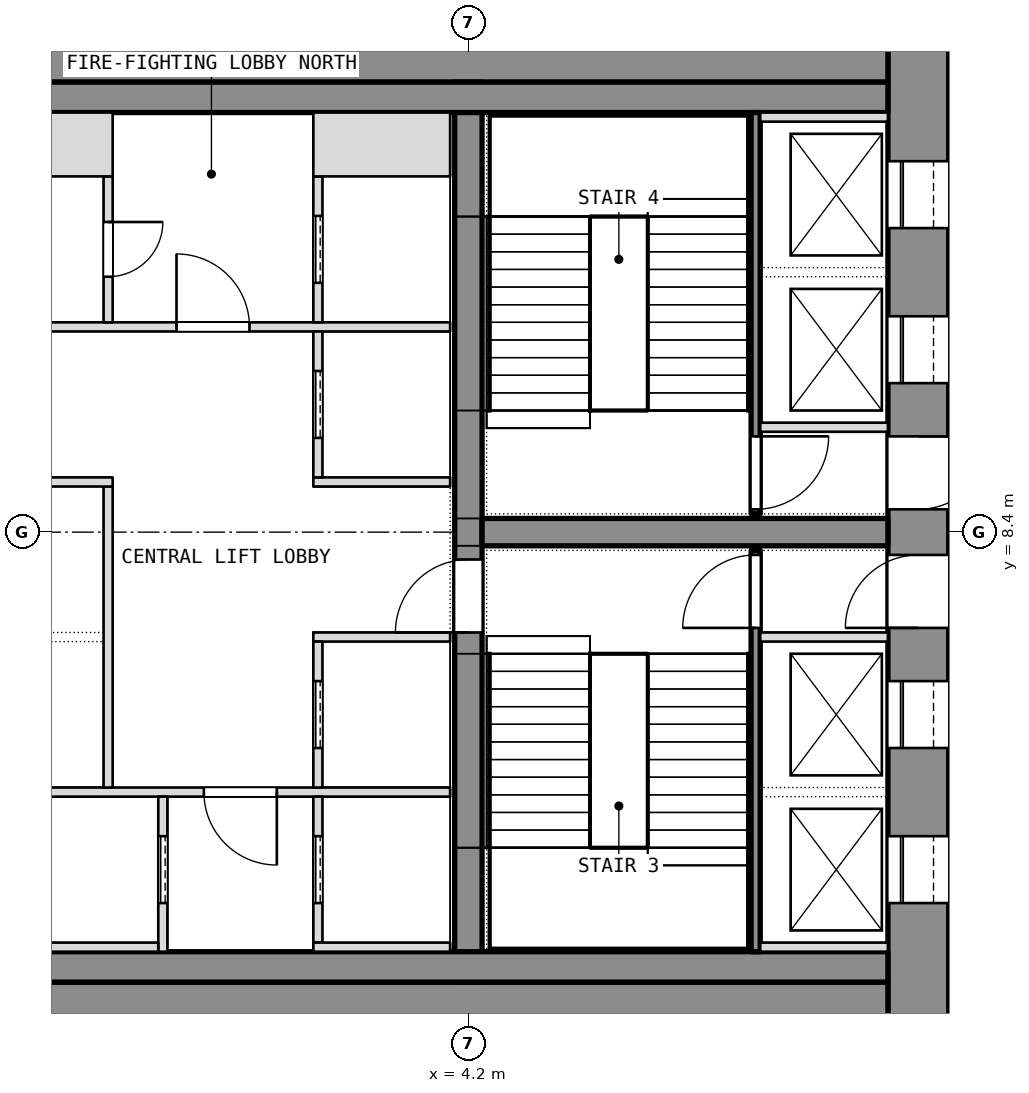
"""IFC4 building model, lengths in metres.
Left out: names, types, materials, properties, quantities, classifications, styles, units other than length and angle.
Written with IfcOpenShell. Run it as: python <this file> out.ifc"""

import sys

from ifc_helpers import new_model, si_unit, direction, frame, frame_2d, origin, place, context, subcontext, project, spatial, rectangle, extrude, element, fill, save


model = new_model("IFC4")
c1 = context("Model", 3, precision=1e-05, world=origin(), true_north=direction((0.0, 1.0)))
c2 = subcontext(c1, "Body", "Model", "MODEL_VIEW")
j1 = project(units=[si_unit("LENGTHUNIT", "METRE"), si_unit("PLANEANGLEUNIT", "RADIAN")], contexts=[c1])
p1 = place(None, origin())
s1 = spatial("IfcSite", under=j1, at=p1, CompositionType="ELEMENT")
p2 = place(p1, origin())
s2 = spatial("IfcBuilding", under=s1, at=p2, CompositionType="ELEMENT")
p3 = place(p2, frame((0.0, 0.0, 97.7)))
s3 = spatial("IfcBuildingStorey", under=s2, at=p3, CompositionType="ELEMENT", Elevation=97.7)
p4 = place(p3, frame((11.6, 0.0, 0.0), z_axis=(0.0, 0.0, 1.0), x_axis=(0.0, 1.0, 0.0)))
e1 = element("IfcWall", 1, at=p4, inside=s3, PredefinedType="SHEAR", context=c2, shape_type="SweptSolid", body=[
    extrude(rectangle(XDim=16.8, YDim=1.0, at=frame_2d((8.4, 0.0))), origin(), (0.0, 0.0, 1.0), 7.2),
])
p5 = place(p4, frame((2.3, 0.0, 0.0)))
e2 = element("IfcOpeningElement", 2, at=p5, cuts=e1, PredefinedType="OPENING", context=c2, shape_type="SweptSolid", body=[
    extrude(rectangle(XDim=1.1, YDim=2.1, at=frame_2d((0.55, 1.05))), frame((0.0, 0.5, 0.0), z_axis=(0.0, -1.0, 0.0), x_axis=(1.0, 0.0, 0.0)), (0.0, 0.0, 1.0), 1.0),
])
p6 = place(p4, frame((4.85, 0.0, 0.0)))
e3 = element("IfcOpeningElement", 3, at=p6, cuts=e1, PredefinedType="OPENING", context=c2, shape_type="SweptSolid", body=[
    extrude(rectangle(XDim=1.1, YDim=2.1, at=frame_2d((0.55, 1.05))), frame((0.0, 0.5, 0.0), z_axis=(0.0, -1.0, 0.0), x_axis=(1.0, 0.0, 0.0)), (0.0, 0.0, 1.0), 1.0),
])
p7 = place(p4, frame((6.825, 0.0, 0.0)))
e4 = element("IfcOpeningElement", 4, at=p7, cuts=e1, PredefinedType="OPENING", context=c2, shape_type="SweptSolid", body=[
    extrude(rectangle(XDim=1.2, YDim=2.1, at=frame_2d((0.6, 1.05))), frame((0.0, 0.5, 0.0), z_axis=(0.0, -1.0, 0.0), x_axis=(1.0, 0.0, 0.0)), (0.0, 0.0, 1.0), 1.0),
])
p8 = place(p4, frame((13.4, 0.0, 0.0)))
e5 = element("IfcOpeningElement", 5, at=p8, cuts=e1, PredefinedType="OPENING", context=c2, shape_type="SweptSolid", body=[
    extrude(rectangle(XDim=1.1, YDim=2.1, at=frame_2d((0.55, 1.05))), frame((0.0, 0.5, 0.0), z_axis=(0.0, -1.0, 0.0), x_axis=(1.0, 0.0, 0.0)), (0.0, 0.0, 1.0), 1.0),
])
p9 = place(p4, frame((10.85, 0.0, 0.0)))
e6 = element("IfcOpeningElement", 6, at=p9, cuts=e1, PredefinedType="OPENING", context=c2, shape_type="SweptSolid", body=[
    extrude(rectangle(XDim=1.1, YDim=2.1, at=frame_2d((0.55, 1.05))), frame((0.0, 0.5, 0.0), z_axis=(0.0, -1.0, 0.0), x_axis=(1.0, 0.0, 0.0)), (0.0, 0.0, 1.0), 1.0),
])
p10 = place(p4, frame((8.775, 0.0, 0.0)))
e7 = element("IfcOpeningElement", 7, at=p10, cuts=e1, PredefinedType="OPENING", context=c2, shape_type="SweptSolid", body=[
    extrude(rectangle(XDim=1.2, YDim=2.1, at=frame_2d((0.6, 1.05))), frame((0.0, 0.5, 0.0), z_axis=(0.0, -1.0, 0.0), x_axis=(1.0, 0.0, 0.0)), (0.0, 0.0, 1.0), 1.0),
])
for number, where, z_axis, x_axis in (
    (8, (-11.1, 0.5, 0.0), (0.0, 0.0, 1.0), (1.0, 0.0, 0.0)),
    (9, (-11.1, 16.3, 0.0), (0.0, 0.0, 1.0), (1.0, 0.0, 0.0)),
):
    element("IfcWall", number, at=place(p3, frame(where, z_axis=z_axis, x_axis=x_axis)), inside=s3, PredefinedType="SHEAR", context=c2, shape_type="SweptSolid", body=[
        extrude(rectangle(XDim=22.2, YDim=1.0, at=frame_2d((11.1, 0.0))), origin(), (0.0, 0.0, 1.0), 7.2),
    ])
p11 = place(p3, frame((4.2, 1.0, 0.0), z_axis=(0.0, 0.0, 1.0), x_axis=(0.0, 1.0, 0.0)))
e10 = element("IfcWall", 10, at=p11, inside=s3, PredefinedType="SHEAR", context=c2, shape_type="SweptSolid", body=[
    extrude(rectangle(XDim=14.8, YDim=0.45, at=frame_2d((7.4, 0.0))), origin(), (0.0, 0.0, 1.0), 7.2),
])
p12 = place(p11, frame((5.75, 0.0, 0.0)))
e11 = element("IfcOpeningElement", 11, at=p12, cuts=e10, PredefinedType="OPENING", context=c2, shape_type="SweptSolid", body=[
    extrude(rectangle(XDim=1.2, YDim=2.1, at=frame_2d((0.6, 1.05))), frame((0.0, 0.225, 0.0), z_axis=(0.0, -1.0, 0.0), x_axis=(1.0, 0.0, 0.0)), (0.0, 0.0, 1.0), 0.45),
])
p13 = place(p3, frame((4.425, 8.4, 0.0), z_axis=(0.0, 0.0, 1.0), x_axis=(1.0, 0.0, 0.0)))
e12 = element("IfcWall", 12, at=p13, inside=s3, PredefinedType="SHEAR", context=c2, shape_type="SweptSolid", body=[
    extrude(rectangle(XDim=6.675, YDim=0.45, at=frame_2d((3.337, 0.0))), origin(), (0.0, 0.0, 1.0), 7.2),
])
for number, where, z_axis, x_axis in (
    (13, (-11.1, 1.25, 0.0), (0.0, 0.0, 1.0), (1.0, 0.0, 0.0)),
    (14, (-11.1, 15.55, 0.0), (0.0, 0.0, 1.0), (1.0, 0.0, 0.0)),
):
    element("IfcWall", number, at=place(p3, frame(where, z_axis=z_axis, x_axis=x_axis)), inside=s3, PredefinedType="PARTITIONING", context=c2, shape_type="SweptSolid", body=[
        extrude(rectangle(XDim=22.2, YDim=0.5, at=frame_2d((11.1, 0.0))), origin(), (0.0, 0.0, 1.0), 6.94),
    ])
p14 = place(p3, frame((8.925, 1.5, 0.0), z_axis=(0.0, 0.0, 1.0), x_axis=(0.0, 1.0, 0.0)))
e15 = element("IfcWall", 15, at=p14, inside=s3, PredefinedType="SHEAR", context=c2, shape_type="SweptSolid", body=[
    extrude(rectangle(XDim=6.6, YDim=0.15, at=frame_2d((3.3, 0.0))), origin(), (0.0, 0.0, 1.0), 6.94),
])
p15 = place(p14, frame((5.325, 0.0, 0.0)))
e16 = element("IfcOpeningElement", 16, at=p15, cuts=e15, PredefinedType="OPENING", context=c2, shape_type="SweptSolid", body=[
    extrude(rectangle(XDim=1.2, YDim=2.1, at=frame_2d((0.6, 1.05))), frame((0.0, 0.075, 0.0), z_axis=(0.0, -1.0, 0.0), x_axis=(1.0, 0.0, 0.0)), (0.0, 0.0, 1.0), 0.15),
])
for number, where, z_axis, x_axis in (
    (17, (9.0, 6.675, 0.0), (0.0, 0.0, 1.0), (1.0, 0.0, 0.0)),
    (18, (9.0, 1.575, 0.0), (0.0, 0.0, 1.0), (1.0, 0.0, 0.0)),
):
    element("IfcWall", number, at=place(p3, frame(where, z_axis=z_axis, x_axis=x_axis)), inside=s3, PredefinedType="SHEAR", context=c2, shape_type="SweptSolid", body=[
        extrude(rectangle(XDim=2.1, YDim=0.15, at=frame_2d((1.05, 0.0))), origin(), (0.0, 0.0, 1.0), 7.2),
    ])
p16 = place(p3, frame((8.925, 8.7, 0.0), z_axis=(0.0, 0.0, 1.0), x_axis=(0.0, 1.0, 0.0)))
e19 = element("IfcWall", 19, at=p16, inside=s3, PredefinedType="SHEAR", context=c2, shape_type="SweptSolid", body=[
    extrude(rectangle(XDim=6.6, YDim=0.15, at=frame_2d((3.3, 0.0))), origin(), (0.0, 0.0, 1.0), 6.94),
])
p17 = place(p16, frame((0.075, 0.0, 0.0)))
e20 = element("IfcOpeningElement", 20, at=p17, cuts=e19, PredefinedType="OPENING", context=c2, shape_type="SweptSolid", body=[
    extrude(rectangle(XDim=1.2, YDim=2.1, at=frame_2d((0.6, 1.05))), frame((0.0, 0.075, 0.0), z_axis=(0.0, -1.0, 0.0), x_axis=(1.0, 0.0, 0.0)), (0.0, 0.0, 1.0), 0.15),
])
for number, where, z_axis, x_axis in (
    (21, (9.0, 10.125, 0.0), (0.0, 0.0, 1.0), (1.0, 0.0, 0.0)),
    (22, (9.0, 15.225, 0.0), (0.0, 0.0, 1.0), (1.0, 0.0, 0.0)),
):
    element("IfcWall", number, at=place(p3, frame(where, z_axis=z_axis, x_axis=x_axis)), inside=s3, PredefinedType="SHEAR", context=c2, shape_type="SweptSolid", body=[
        extrude(rectangle(XDim=2.1, YDim=0.15, at=frame_2d((1.05, 0.0))), origin(), (0.0, 0.0, 1.0), 7.2),
    ])
p18 = place(p3, frame((-3.9, 4.125, 0.0), z_axis=(0.0, 0.0, 1.0), x_axis=(1.0, 0.0, 0.0)))
e23 = element("IfcWall", 23, at=p18, inside=s3, PredefinedType="PARTITIONING", context=c2, shape_type="SweptSolid", body=[
    extrude(rectangle(XDim=7.8, YDim=0.15, at=frame_2d((3.9, 0.0))), origin(), (0.0, 0.0, 1.0), 6.94),
])
p19 = place(p18, frame((3.75, 0.0, 0.0)))
e24 = element("IfcOpeningElement", 24, at=p19, cuts=e23, PredefinedType="OPENING", context=c2, shape_type="SweptSolid", body=[
    extrude(rectangle(XDim=1.2, YDim=2.1, at=frame_2d((0.6, 1.05))), frame((0.0, 0.075, 0.0), z_axis=(0.0, -1.0, 0.0), x_axis=(1.0, 0.0, 0.0)), (0.0, 0.0, 1.0), 0.15),
])
p20 = place(p3, frame((-3.9, 11.775, 0.0), z_axis=(0.0, 0.0, 1.0), x_axis=(1.0, 0.0, 0.0)))
e25 = element("IfcWall", 25, at=p20, inside=s3, PredefinedType="PARTITIONING", context=c2, shape_type="SweptSolid", body=[
    extrude(rectangle(XDim=7.8, YDim=0.15, at=frame_2d((3.9, 0.0))), origin(), (0.0, 0.0, 1.0), 6.94),
])
p21 = place(p20, frame((3.3, 0.0, 0.0)))
e26 = element("IfcOpeningElement", 26, at=p21, cuts=e25, PredefinedType="OPENING", context=c2, shape_type="SweptSolid", body=[
    extrude(rectangle(XDim=1.2, YDim=2.1, at=frame_2d((0.6, 1.05))), frame((0.0, 0.075, 0.0), z_axis=(0.0, -1.0, 0.0), x_axis=(1.0, 0.0, 0.0)), (0.0, 0.0, 1.0), 0.15),
])
p22 = place(p3, frame((-0.825, 1.5, 0.0), z_axis=(0.0, 0.0, 1.0), x_axis=(0.0, 1.0, 0.0)))
e27 = element("IfcWall", 27, at=p22, inside=s3, PredefinedType="SHEAR", context=c2, shape_type="SweptSolid", body=[
    extrude(rectangle(XDim=2.55, YDim=0.15, at=frame_2d((1.275, 0.0))), origin(), (0.0, 0.0, 1.0), 7.2),
])
p23 = place(p22, frame((0.8, 0.0, 0.0)))
e28 = element("IfcOpeningElement", 28, at=p23, cuts=e27, PredefinedType="OPENING", context=c2, shape_type="SweptSolid", body=[
    extrude(rectangle(XDim=1.1, YDim=2.1, at=frame_2d((0.55, 1.05))), frame((0.0, 0.075, 0.0), z_axis=(0.0, -1.0, 0.0), x_axis=(1.0, 0.0, 0.0)), (0.0, 0.0, 1.0), 0.15),
])
p24 = place(p3, frame((-3.9, 1.575, 0.0), z_axis=(0.0, 0.0, 1.0), x_axis=(1.0, 0.0, 0.0)))
e29 = element("IfcWall", 29, at=p24, inside=s3, PredefinedType="SHEAR", context=c2, shape_type="SweptSolid", body=[
    extrude(rectangle(XDim=3.0, YDim=0.15, at=frame_2d((1.5, 0.0))), origin(), (0.0, 0.0, 1.0), 7.2),
])
p25 = place(p3, frame((-1.725, 4.2, 0.0), z_axis=(0.0, 0.0, 1.0), x_axis=(0.0, 1.0, 0.0)))
e30 = element("IfcWall", 30, at=p25, inside=s3, PredefinedType="SHEAR", context=c2, shape_type="SweptSolid", body=[
    extrude(rectangle(XDim=4.95, YDim=0.15, at=frame_2d((2.475, 0.0))), origin(), (0.0, 0.0, 1.0), 7.2),
])
p26 = place(p3, frame((-3.9, 9.225, 0.0), z_axis=(0.0, 0.0, 1.0), x_axis=(1.0, 0.0, 0.0)))
e31 = element("IfcWall", 31, at=p26, inside=s3, PredefinedType="SHEAR", context=c2, shape_type="SweptSolid", body=[
    extrude(rectangle(XDim=2.25, YDim=0.15, at=frame_2d((1.125, 0.0))), origin(), (0.0, 0.0, 1.0), 7.2),
])
p27 = place(p3, frame((-1.725, 11.85, 0.0), z_axis=(0.0, 0.0, 1.0), x_axis=(0.0, 1.0, 0.0)))
e32 = element("IfcWall", 32, at=p27, inside=s3, PredefinedType="PARTITIONING", context=c2, shape_type="SweptSolid", body=[
    extrude(rectangle(XDim=2.4, YDim=0.15, at=frame_2d((1.2, 0.0))), origin(), (0.0, 0.0, 1.0), 6.94),
])
p28 = place(p27, frame((0.75, 0.0, 0.0)))
e33 = element("IfcOpeningElement", 33, at=p28, cuts=e32, PredefinedType="OPENING", context=c2, shape_type="SweptSolid", body=[
    extrude(rectangle(XDim=0.9, YDim=2.1, at=frame_2d((0.45, 1.05))), frame((0.0, 0.075, 0.0), z_axis=(0.0, -1.0, 0.0), x_axis=(1.0, 0.0, 0.0)), (0.0, 0.0, 1.0), 0.15),
])
p29 = place(p3, frame((-3.9, 14.775, 0.0), z_axis=(0.0, 0.0, 1.0), x_axis=(1.0, 0.0, 0.0)))
e34 = element("IfcWall", 34, at=p29, inside=s3, PredefinedType="PARTITIONING", context=c2, shape_type="SweptSolid", body=[
    extrude(rectangle(XDim=2.25, YDim=1.05, at=frame_2d((1.125, 0.0))), origin(), (0.0, 0.0, 1.0), 6.94),
])
p30 = place(p3, frame((1.725, 1.65, 0.0), z_axis=(0.0, 0.0, 1.0), x_axis=(0.0, 1.0, 0.0)))
e35 = element("IfcWall", 35, at=p30, inside=s3, PredefinedType="SHEAR", context=c2, shape_type="SweptSolid", body=[
    extrude(rectangle(XDim=2.4, YDim=0.15, at=frame_2d((1.2, 0.0))), origin(), (0.0, 0.0, 1.0), 7.2),
])
p31 = place(p30, frame((0.65, 0.0, 0.0)))
e36 = element("IfcOpeningElement", 36, at=p31, cuts=e35, PredefinedType="OPENING", context=c2, shape_type="SweptSolid", body=[
    extrude(rectangle(XDim=1.1, YDim=2.1, at=frame_2d((0.55, 1.05))), frame((0.0, 0.075, 0.0), z_axis=(0.0, -1.0, 0.0), x_axis=(1.0, 0.0, 0.0)), (0.0, 0.0, 1.0), 0.15),
])
p32 = place(p3, frame((1.65, 1.575, 0.0), z_axis=(0.0, 0.0, 1.0), x_axis=(1.0, 0.0, 0.0)))
e37 = element("IfcWall", 37, at=p32, inside=s3, PredefinedType="SHEAR", context=c2, shape_type="SweptSolid", body=[
    extrude(rectangle(XDim=2.25, YDim=0.15, at=frame_2d((1.125, 0.0))), origin(), (0.0, 0.0, 1.0), 7.2),
])
p33 = place(p3, frame((1.725, 11.85, 0.0), z_axis=(0.0, 0.0, 1.0), x_axis=(0.0, 1.0, 0.0)))
e38 = element("IfcWall", 38, at=p33, inside=s3, PredefinedType="SHEAR", context=c2, shape_type="SweptSolid", body=[
    extrude(rectangle(XDim=2.4, YDim=0.15, at=frame_2d((1.2, 0.0))), origin(), (0.0, 0.0, 1.0), 7.2),
])
p34 = place(p33, frame((0.65, 0.0, 0.0)))
e39 = element("IfcOpeningElement", 39, at=p34, cuts=e38, PredefinedType="OPENING", context=c2, shape_type="SweptSolid", body=[
    extrude(rectangle(XDim=1.1, YDim=2.1, at=frame_2d((0.55, 1.05))), frame((0.0, 0.075, 0.0), z_axis=(0.0, -1.0, 0.0), x_axis=(1.0, 0.0, 0.0)), (0.0, 0.0, 1.0), 0.15),
])
p35 = place(p3, frame((1.65, 14.775, 0.0), z_axis=(0.0, 0.0, 1.0), x_axis=(1.0, 0.0, 0.0)))
e40 = element("IfcWall", 40, at=p35, inside=s3, PredefinedType="SHEAR", context=c2, shape_type="SweptSolid", body=[
    extrude(rectangle(XDim=2.25, YDim=1.05, at=frame_2d((1.125, 0.0))), origin(), (0.0, 0.0, 1.0), 7.2),
])
for number, where, z_axis, x_axis in (
    (41, (1.65, 6.675, 0.0), (0.0, 0.0, 1.0), (1.0, 0.0, 0.0)),
    (42, (1.65, 9.225, 0.0), (0.0, 0.0, 1.0), (1.0, 0.0, 0.0)),
):
    element("IfcWall", number, at=place(p3, frame(where, z_axis=z_axis, x_axis=x_axis)), inside=s3, PredefinedType="SHEAR", context=c2, shape_type="SweptSolid", body=[
        extrude(rectangle(XDim=2.25, YDim=0.15, at=frame_2d((1.125, 0.0))), origin(), (0.0, 0.0, 1.0), 7.2),
    ])
p36 = place(p3, frame((1.725, 4.2, 0.0), z_axis=(0.0, 0.0, 1.0), x_axis=(0.0, 1.0, 0.0)))
e43 = element("IfcWall", 43, at=p36, inside=s3, PredefinedType="SHEAR", context=c2, shape_type="SweptSolid", body=[
    extrude(rectangle(XDim=2.4, YDim=0.15, at=frame_2d((1.2, 0.0))), origin(), (0.0, 0.0, 1.0), 7.2),
])
p37 = place(p36, frame((0.65, 0.0, 0.0)))
e44 = element("IfcOpeningElement", 44, at=p37, cuts=e43, PredefinedType="OPENING", context=c2, shape_type="SweptSolid", body=[
    extrude(rectangle(XDim=1.1, YDim=2.1, at=frame_2d((0.55, 1.05))), frame((0.0, 0.075, 0.0), z_axis=(0.0, -1.0, 0.0), x_axis=(1.0, 0.0, 0.0)), (0.0, 0.0, 1.0), 0.15),
])
p38 = place(p3, frame((1.725, 9.3, 0.0), z_axis=(0.0, 0.0, 1.0), x_axis=(0.0, 1.0, 0.0)))
e45 = element("IfcWall", 45, at=p38, inside=s3, PredefinedType="SHEAR", context=c2, shape_type="SweptSolid", body=[
    extrude(rectangle(XDim=2.4, YDim=0.15, at=frame_2d((1.2, 0.0))), origin(), (0.0, 0.0, 1.0), 7.2),
])
p39 = place(p38, frame((0.65, 0.0, 0.0)))
e46 = element("IfcOpeningElement", 46, at=p39, cuts=e45, PredefinedType="OPENING", context=c2, shape_type="SweptSolid", body=[
    extrude(rectangle(XDim=1.1, YDim=2.1, at=frame_2d((0.55, 1.05))), frame((0.0, 0.075, 0.0), z_axis=(0.0, -1.0, 0.0), x_axis=(1.0, 0.0, 0.0)), (0.0, 0.0, 1.0), 0.15),
])
p40 = place(p5, origin())
e47 = element("IfcDoor", 47, at=p40, inside=s3, OperationType="SLIDING_TO_LEFT", PredefinedType="DOOR", context=c2, shape_type="SweptSolid", body=[
    extrude(rectangle(XDim=1.1, YDim=2.1, at=frame_2d((0.55, 1.05))), frame((0.0, 0.025, 0.0), z_axis=(0.0, -1.0, 0.0), x_axis=(1.0, 0.0, 0.0)), (0.0, 0.0, 1.0), 0.05),
])
fill(e2, e47)
p41 = place(p6, origin())
e48 = element("IfcDoor", 48, at=p41, inside=s3, OperationType="SLIDING_TO_LEFT", PredefinedType="DOOR", context=c2, shape_type="SweptSolid", body=[
    extrude(rectangle(XDim=1.1, YDim=2.1, at=frame_2d((0.55, 1.05))), frame((0.0, 0.025, 0.0), z_axis=(0.0, -1.0, 0.0), x_axis=(1.0, 0.0, 0.0)), (0.0, 0.0, 1.0), 0.05),
])
fill(e3, e48)
p42 = place(p7, origin())
e49 = element("IfcDoor", 49, at=p42, inside=s3, OperationType="SINGLE_SWING_LEFT", PredefinedType="DOOR", context=c2, shape_type="SweptSolid", body=[
    extrude(rectangle(XDim=1.2, YDim=2.1, at=frame_2d((0.6, 1.05))), frame((0.0, 0.025, 0.0), z_axis=(0.0, -1.0, 0.0), x_axis=(1.0, 0.0, 0.0)), (0.0, 0.0, 1.0), 0.05),
])
fill(e4, e49)
p43 = place(p15, origin())
e50 = element("IfcDoor", 50, at=p43, inside=s3, OperationType="SINGLE_SWING_LEFT", PredefinedType="DOOR", context=c2, shape_type="SweptSolid", body=[
    extrude(rectangle(XDim=1.2, YDim=2.1, at=frame_2d((0.6, 1.05))), frame((0.0, 0.025, 0.0), z_axis=(0.0, -1.0, 0.0), x_axis=(1.0, 0.0, 0.0)), (0.0, 0.0, 1.0), 0.05),
])
fill(e16, e50)
p44 = place(p8, origin())
e51 = element("IfcDoor", 51, at=p44, inside=s3, OperationType="SLIDING_TO_LEFT", PredefinedType="DOOR", context=c2, shape_type="SweptSolid", body=[
    extrude(rectangle(XDim=1.1, YDim=2.1, at=frame_2d((0.55, 1.05))), frame((0.0, 0.025, 0.0), z_axis=(0.0, -1.0, 0.0), x_axis=(1.0, 0.0, 0.0)), (0.0, 0.0, 1.0), 0.05),
])
fill(e5, e51)
p45 = place(p9, origin())
e52 = element("IfcDoor", 52, at=p45, inside=s3, OperationType="SLIDING_TO_LEFT", PredefinedType="DOOR", context=c2, shape_type="SweptSolid", body=[
    extrude(rectangle(XDim=1.1, YDim=2.1, at=frame_2d((0.55, 1.05))), frame((0.0, 0.025, 0.0), z_axis=(0.0, -1.0, 0.0), x_axis=(1.0, 0.0, 0.0)), (0.0, 0.0, 1.0), 0.05),
])
fill(e6, e52)
p46 = place(p10, origin())
e53 = element("IfcDoor", 53, at=p46, inside=s3, OperationType="SINGLE_SWING_LEFT", PredefinedType="DOOR", context=c2, shape_type="SweptSolid", body=[
    extrude(rectangle(XDim=1.2, YDim=2.1, at=frame_2d((0.6, 1.05))), frame((0.0, 0.025, 0.0), z_axis=(0.0, -1.0, 0.0), x_axis=(1.0, 0.0, 0.0)), (0.0, 0.0, 1.0), 0.05),
])
fill(e7, e53)
p47 = place(p17, origin())
e54 = element("IfcDoor", 54, at=p47, inside=s3, OperationType="SINGLE_SWING_LEFT", PredefinedType="DOOR", context=c2, shape_type="SweptSolid", body=[
    extrude(rectangle(XDim=1.2, YDim=2.1, at=frame_2d((0.6, 1.05))), frame((0.0, 0.025, 0.0), z_axis=(0.0, -1.0, 0.0), x_axis=(1.0, 0.0, 0.0)), (0.0, 0.0, 1.0), 0.05),
])
fill(e20, e54)
p48 = place(p23, origin())
e55 = element("IfcDoor", 55, at=p48, inside=s3, OperationType="SLIDING_TO_LEFT", PredefinedType="DOOR", context=c2, shape_type="SweptSolid", body=[
    extrude(rectangle(XDim=1.1, YDim=2.1, at=frame_2d((0.55, 1.05))), frame((0.0, 0.025, 0.0), z_axis=(0.0, -1.0, 0.0), x_axis=(1.0, 0.0, 0.0)), (0.0, 0.0, 1.0), 0.05),
])
fill(e28, e55)
p49 = place(p31, origin())
e56 = element("IfcDoor", 56, at=p49, inside=s3, OperationType="SLIDING_TO_LEFT", PredefinedType="DOOR", context=c2, shape_type="SweptSolid", body=[
    extrude(rectangle(XDim=1.1, YDim=2.1, at=frame_2d((0.55, 1.05))), frame((0.0, 0.025, 0.0), z_axis=(0.0, -1.0, 0.0), x_axis=(1.0, 0.0, 0.0)), (0.0, 0.0, 1.0), 0.05),
])
fill(e36, e56)
p50 = place(p37, origin())
e57 = element("IfcDoor", 57, at=p50, inside=s3, OperationType="SLIDING_TO_LEFT", PredefinedType="DOOR", context=c2, shape_type="SweptSolid", body=[
    extrude(rectangle(XDim=1.1, YDim=2.1, at=frame_2d((0.55, 1.05))), frame((0.0, 0.025, 0.0), z_axis=(0.0, -1.0, 0.0), x_axis=(1.0, 0.0, 0.0)), (0.0, 0.0, 1.0), 0.05),
])
fill(e44, e57)
p51 = place(p39, origin())
e58 = element("IfcDoor", 58, at=p51, inside=s3, OperationType="SLIDING_TO_LEFT", PredefinedType="DOOR", context=c2, shape_type="SweptSolid", body=[
    extrude(rectangle(XDim=1.1, YDim=2.1, at=frame_2d((0.55, 1.05))), frame((0.0, 0.025, 0.0), z_axis=(0.0, -1.0, 0.0), x_axis=(1.0, 0.0, 0.0)), (0.0, 0.0, 1.0), 0.05),
])
fill(e46, e58)
p52 = place(p34, origin())
e59 = element("IfcDoor", 59, at=p52, inside=s3, OperationType="SLIDING_TO_LEFT", PredefinedType="DOOR", context=c2, shape_type="SweptSolid", body=[
    extrude(rectangle(XDim=1.1, YDim=2.1, at=frame_2d((0.55, 1.05))), frame((0.0, 0.025, 0.0), z_axis=(0.0, -1.0, 0.0), x_axis=(1.0, 0.0, 0.0)), (0.0, 0.0, 1.0), 0.05),
])
fill(e39, e59)
p53 = place(p19, origin())
e60 = element("IfcDoor", 60, at=p53, inside=s3, OperationType="SINGLE_SWING_LEFT", PredefinedType="DOOR", context=c2, shape_type="SweptSolid", body=[
    extrude(rectangle(XDim=1.2, YDim=2.1, at=frame_2d((0.6, 1.05))), frame((0.0, 0.025, 0.0), z_axis=(0.0, -1.0, 0.0), x_axis=(1.0, 0.0, 0.0)), (0.0, 0.0, 1.0), 0.05),
])
fill(e24, e60)
p54 = place(p21, origin())
e61 = element("IfcDoor", 61, at=p54, inside=s3, OperationType="SINGLE_SWING_LEFT", PredefinedType="DOOR", context=c2, shape_type="SweptSolid", body=[
    extrude(rectangle(XDim=1.2, YDim=2.1, at=frame_2d((0.6, 1.05))), frame((0.0, 0.025, 0.0), z_axis=(0.0, -1.0, 0.0), x_axis=(1.0, 0.0, 0.0)), (0.0, 0.0, 1.0), 0.05),
])
fill(e26, e61)
p55 = place(p28, origin())
e62 = element("IfcDoor", 62, at=p55, inside=s3, OperationType="SINGLE_SWING_LEFT", PredefinedType="DOOR", context=c2, shape_type="SweptSolid", body=[
    extrude(rectangle(XDim=0.9, YDim=2.1, at=frame_2d((0.45, 1.05))), frame((0.0, 0.025, 0.0), z_axis=(0.0, -1.0, 0.0), x_axis=(1.0, 0.0, 0.0)), (0.0, 0.0, 1.0), 0.05),
])
fill(e33, e62)
p56 = place(p12, origin())
e63 = element("IfcDoor", 63, at=p56, inside=s3, OperationType="SINGLE_SWING_LEFT", PredefinedType="DOOR", context=c2, shape_type="SweptSolid", body=[
    extrude(rectangle(XDim=1.2, YDim=2.1, at=frame_2d((0.6, 1.05))), frame((0.0, 0.025, 0.0), z_axis=(0.0, -1.0, 0.0), x_axis=(1.0, 0.0, 0.0)), (0.0, 0.0, 1.0), 0.05),
])
fill(e11, e63)
save(model, sys.argv[1])
